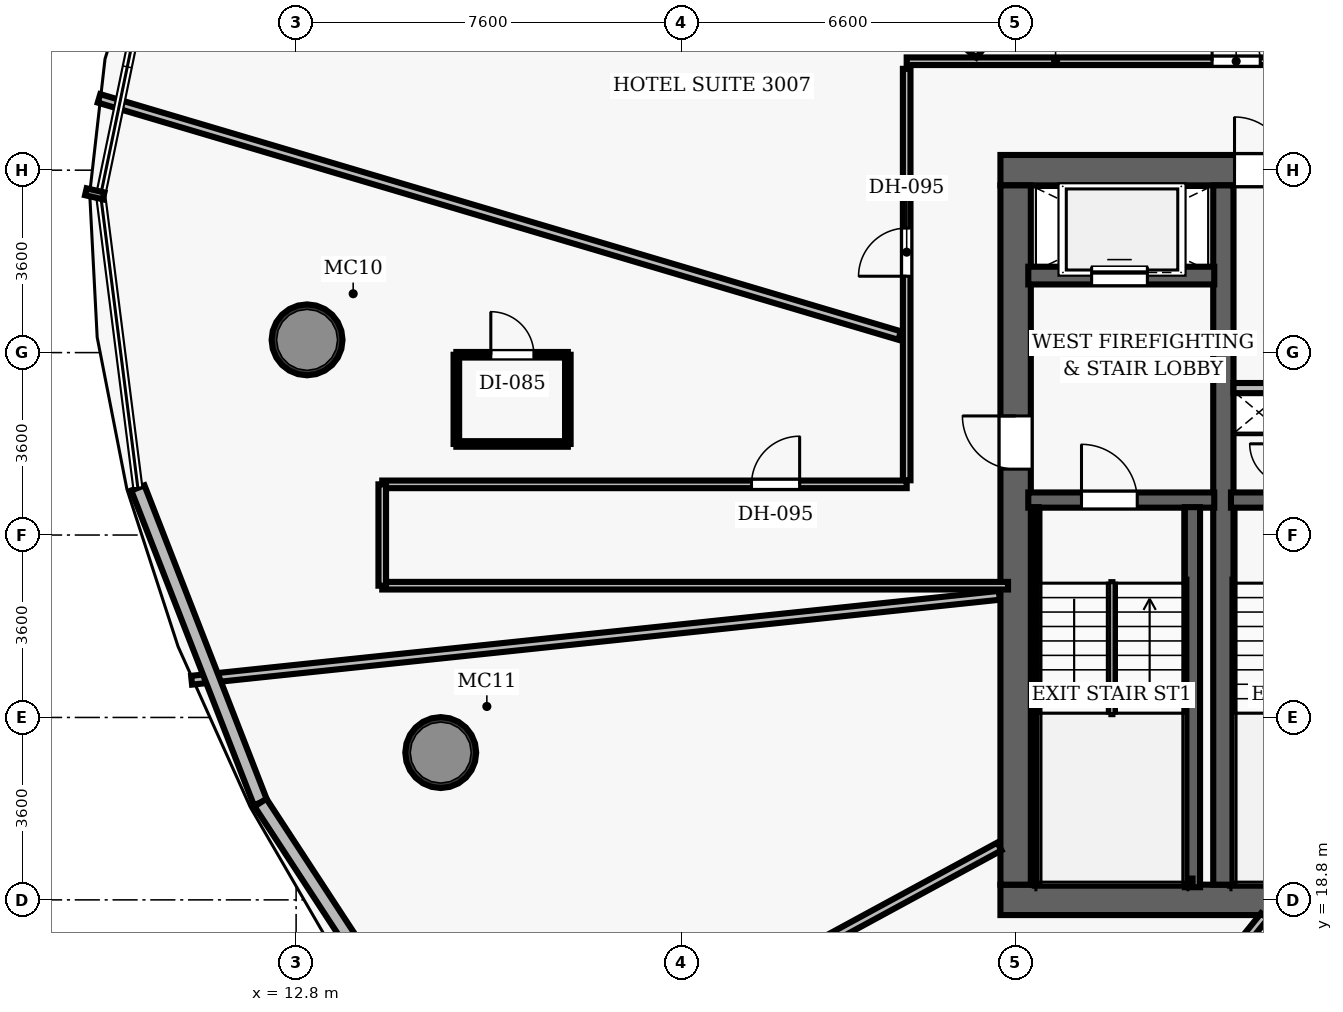
"""IFC4 building model, lengths in metres.
Left out: names, types, materials, properties, quantities, classifications, styles, units other than length and angle.
Written with IfcOpenShell. Run it as: python <this file> out.ifc"""

import sys

from ifc_helpers import new_model, si_unit, direction, frame, frame_2d, origin, origin_2d, place, context, subcontext, project, spatial, rectangle, hollow_circle, extrude, element, fill, save


model = new_model("IFC4")
c1 = context("Model", 3, precision=1e-05, world=origin(), true_north=direction((0.0, 1.0)))
c2 = subcontext(c1, "Body", "Model", "MODEL_VIEW")
j1 = project(units=[si_unit("LENGTHUNIT", "METRE"), si_unit("PLANEANGLEUNIT", "RADIAN")], contexts=[c1])
p1 = place(None, origin())
s1 = spatial("IfcSite", under=j1, at=p1, CompositionType="ELEMENT")
p2 = place(p1, origin())
s2 = spatial("IfcBuilding", under=s1, at=p2, CompositionType="ELEMENT")
p3 = place(p2, frame((0.0, 0.0, 123.8)))
s3 = spatial("IfcBuildingStorey", under=s2, at=p3, CompositionType="ELEMENT", Elevation=123.8)
p4 = place(p3, frame((26.7, 18.8, 0.0), z_axis=(0.0, 0.0, 1.0), x_axis=(1.0, 0.0, 0.0)))
e1 = element("IfcWall", 1, at=p4, inside=s3, PredefinedType="SHEAR", context=c2, shape_type="SweptSolid", body=[
    extrude(rectangle(XDim=22.6, YDim=0.6, at=frame_2d((11.3, 0.0))), origin(), (0.0, 0.0, 1.0), 3.5),
])
p5 = place(p4, frame((14.52, 0.0, 0.0)))
e2 = element("IfcOpeningElement", 2, at=p5, cuts=e1, PredefinedType="OPENING", context=c2, shape_type="SweptSolid", body=[
    extrude(rectangle(XDim=1.05, YDim=2.15, at=frame_2d((0.525, 1.075))), frame((0.0, 0.31, 0.0), z_axis=(0.0, -1.0, 0.0), x_axis=(1.0, 0.0, 0.0)), (0.0, 0.0, 1.0), 0.62),
])
p6 = place(p3, frame((26.7, 33.2, 0.0), z_axis=(0.0, 0.0, 1.0), x_axis=(1.0, 0.0, 0.0)))
e3 = element("IfcWall", 3, at=p6, inside=s3, PredefinedType="SHEAR", context=c2, shape_type="SweptSolid", body=[
    extrude(rectangle(XDim=22.6, YDim=0.6, at=frame_2d((11.3, 0.0))), origin(), (0.0, 0.0, 1.0), 3.5),
])
p7 = place(p6, frame((4.62, 0.0, 0.0)))
e4 = element("IfcOpeningElement", 4, at=p7, cuts=e3, PredefinedType="OPENING", context=c2, shape_type="SweptSolid", body=[
    extrude(rectangle(XDim=1.05, YDim=2.15, at=frame_2d((0.525, 1.075))), frame((0.0, 0.31, 0.0), z_axis=(0.0, -1.0, 0.0), x_axis=(1.0, 0.0, 0.0)), (0.0, 0.0, 1.0), 0.62),
])
p8 = place(p6, frame((14.52, 0.0, 0.0)))
e5 = element("IfcOpeningElement", 5, at=p8, cuts=e3, PredefinedType="OPENING", context=c2, shape_type="SweptSolid", body=[
    extrude(rectangle(XDim=1.05, YDim=2.15, at=frame_2d((0.525, 1.075))), frame((0.0, 0.31, 0.0), z_axis=(0.0, -1.0, 0.0), x_axis=(1.0, 0.0, 0.0)), (0.0, 0.0, 1.0), 0.62),
])
p9 = place(p3, frame((27.0, 19.1, 0.0), z_axis=(0.0, 0.0, 1.0), x_axis=(0.0, 1.0, 0.0)))
e6 = element("IfcWall", 6, at=p9, inside=s3, PredefinedType="SHEAR", context=c2, shape_type="SweptSolid", body=[
    extrude(rectangle(XDim=13.8, YDim=0.6, at=frame_2d((6.9, 0.0))), origin(), (0.0, 0.0, 1.0), 3.5),
])
p10 = place(p9, frame((8.2, 0.0, 0.0)))
e7 = element("IfcOpeningElement", 7, at=p10, cuts=e6, PredefinedType="OPENING", context=c2, shape_type="SweptSolid", body=[
    extrude(rectangle(XDim=1.05, YDim=2.15, at=frame_2d((0.525, 1.075))), frame((0.0, 0.31, 0.0), z_axis=(0.0, -1.0, 0.0), x_axis=(1.0, 0.0, 0.0)), (0.0, 0.0, 1.0), 0.62),
])
p11 = place(p3, frame((31.1, 19.1, 0.0), z_axis=(0.0, 0.0, 1.0), x_axis=(0.0, 1.0, 0.0)))
e8 = element("IfcWall", 8, at=p11, inside=s3, PredefinedType="SHEAR", context=c2, shape_type="SweptSolid", body=[
    extrude(rectangle(XDim=13.8, YDim=0.4, at=frame_2d((6.9, 0.0))), origin(), (0.0, 0.0, 1.0), 3.5),
])
for number, where, z_axis, x_axis in (
    (9, (13.016, 29.852, 0.0), (0.0, 0.0, 1.0), (1.0, 0.0, 0.0)),
    (10, (15.654, 21.707, 0.0), (0.0, 0.0, 1.0), (1.0, 0.0, 0.0)),
):
    element("IfcColumn", number, at=place(p3, frame(where, z_axis=z_axis, x_axis=x_axis)), inside=s3, PredefinedType="COLUMN", context=c2, shape_type="SweptSolid", body=[
        extrude(hollow_circle(Radius=0.7, WallThickness=0.055, at=origin_2d()), origin(), (0.0, 0.0, 1.0), 3.5),
    ])
p12 = place(p3, frame((27.25, 26.69, 0.0), z_axis=(0.0, 0.0, 1.0), x_axis=(1.0, 0.0, 0.0)))
e11 = element("IfcWall", 11, at=p12, inside=s3, PredefinedType="SHEAR", context=c2, shape_type="SweptSolid", body=[
    extrude(rectangle(XDim=3.67, YDim=0.3, at=frame_2d((1.835, 0.0))), origin(), (0.0, 0.0, 1.0), 3.5),
])
p13 = place(p12, frame((1.05, 0.0, 0.0)))
e12 = element("IfcOpeningElement", 12, at=p13, cuts=e11, PredefinedType="OPENING", context=c2, shape_type="SweptSolid", body=[
    extrude(rectangle(XDim=1.1, YDim=2.15, at=frame_2d((0.55, 1.075))), frame((0.0, 0.16, 0.0), z_axis=(0.0, -1.0, 0.0), x_axis=(1.0, 0.0, 0.0)), (0.0, 0.0, 1.0), 0.32),
])
p14 = place(p3, frame((30.49, 19.05, 0.0), z_axis=(0.0, 0.0, 1.0), x_axis=(0.0, 1.0, 0.0)))
e13 = element("IfcWall", 13, at=p14, inside=s3, PredefinedType="SHEAR", context=c2, shape_type="SweptSolid", body=[
    extrude(rectangle(XDim=7.5, YDim=0.3, at=frame_2d((3.75, 0.0))), origin(), (0.0, 0.0, 1.0), 3.5),
])
p15 = place(p3, frame((27.395, 19.1, 0.0), z_axis=(0.0, 0.0, 1.0), x_axis=(0.0, 1.0, 0.0)))
e14 = element("IfcWall", 14, at=p15, inside=s3, PredefinedType="SHEAR", context=c2, shape_type="SweptSolid", body=[
    extrude(rectangle(XDim=7.45, YDim=0.12, at=frame_2d((3.725, 0.0))), origin(), (0.0, 0.0, 1.0), 3.5),
])
p16 = place(p3, frame((27.395, 19.16, 0.0), z_axis=(0.0, 0.0, 1.0), x_axis=(1.0, 0.0, 0.0)))
e15 = element("IfcWall", 15, at=p16, inside=s3, PredefinedType="SHEAR", context=c2, shape_type="SweptSolid", body=[
    extrude(rectangle(XDim=3.095, YDim=0.12, at=frame_2d((1.547, 0.0))), origin(), (0.0, 0.0, 1.0), 3.5),
])
p17 = place(p3, frame((27.25, 31.12, 0.0), z_axis=(0.0, 0.0, 1.0), x_axis=(1.0, 0.0, 0.0)))
e16 = element("IfcWall", 16, at=p17, inside=s3, PredefinedType="SHEAR", context=c2, shape_type="SweptSolid", body=[
    extrude(rectangle(XDim=3.67, YDim=0.35, at=frame_2d((1.835, 0.0))), origin(), (0.0, 0.0, 1.0), 2.675),
])
p18 = place(p17, frame((1.25, 0.0, 0.0)))
e17 = element("IfcOpeningElement", 17, at=p18, cuts=e16, PredefinedType="OPENING", context=c2, shape_type="SweptSolid", body=[
    extrude(rectangle(XDim=1.1, YDim=2.15, at=frame_2d((0.55, 1.075))), frame((0.0, 0.185, 0.0), z_axis=(0.0, -1.0, 0.0), x_axis=(1.0, 0.0, 0.0)), (0.0, 0.0, 1.0), 0.37),
])
p19 = place(p3, frame((31.25, 26.69, 0.0), z_axis=(0.0, 0.0, 1.0), x_axis=(1.0, 0.0, 0.0)))
e18 = element("IfcWall", 18, at=p19, inside=s3, PredefinedType="SHEAR", context=c2, shape_type="SweptSolid", body=[
    extrude(rectangle(XDim=3.56, YDim=0.3, at=frame_2d((1.78, 0.0))), origin(), (0.0, 0.0, 1.0), 3.5),
])
p20 = place(p19, frame((1.55, 0.0, 0.0)))
e19 = element("IfcOpeningElement", 19, at=p20, cuts=e18, PredefinedType="OPENING", context=c2, shape_type="SweptSolid", body=[
    extrude(rectangle(XDim=1.1, YDim=2.15, at=frame_2d((0.55, 1.075))), frame((0.0, 0.16, 0.0), z_axis=(0.0, -1.0, 0.0), x_axis=(1.0, 0.0, 0.0)), (0.0, 0.0, 1.0), 0.32),
])
p21 = place(p3, frame((31.3, 19.16, 0.0), z_axis=(0.0, 0.0, 1.0), x_axis=(1.0, 0.0, 0.0)))
e20 = element("IfcWall", 20, at=p21, inside=s3, PredefinedType="SHEAR", context=c2, shape_type="SweptSolid", body=[
    extrude(rectangle(XDim=3.04, YDim=0.12, at=frame_2d((1.52, 0.0))), origin(), (0.0, 0.0, 1.0), 3.5),
])
p22 = place(p3, frame((31.3, 28.9, 0.0), z_axis=(0.0, 0.0, 1.0), x_axis=(1.0, 0.0, 0.0)))
e21 = element("IfcWall", 21, at=p22, inside=s3, PredefinedType="PARTITIONING", context=c2, shape_type="SweptSolid", body=[
    extrude(rectangle(XDim=1.12, YDim=0.2, at=frame_2d((0.56, 0.0))), origin(), (0.0, 0.0, 1.0), 2.675),
])
p23 = place(p3, frame((24.85, 35.35, 0.0), z_axis=(0.0, 0.0, 1.0), x_axis=(1.0, 0.0, 0.0)))
e22 = element("IfcWall", 22, at=p23, inside=s3, PredefinedType="PARTITIONING", context=c2, shape_type="SweptSolid", body=[
    extrude(rectangle(XDim=26.0, YDim=0.15, at=frame_2d((13.0, 0.0))), origin(), (0.0, 0.0, 1.0), 2.675),
])
p24 = place(p23, frame((21.964, 0.0, 0.0)))
e23 = element("IfcOpeningElement", 23, at=p24, cuts=e22, PredefinedType="OPENING", context=c2, shape_type="SweptSolid", body=[
    extrude(rectangle(XDim=0.95, YDim=2.15, at=frame_2d((0.475, 1.075))), frame((0.0, 0.085, 0.0), z_axis=(0.0, -1.0, 0.0), x_axis=(1.0, 0.0, 0.0)), (0.0, 0.0, 1.0), 0.17),
])
p25 = place(p23, frame((16.552, 0.0, 0.0)))
e24 = element("IfcOpeningElement", 24, at=p25, cuts=e22, PredefinedType="OPENING", context=c2, shape_type="SweptSolid", body=[
    extrude(rectangle(XDim=0.95, YDim=2.15, at=frame_2d((0.475, 1.075))), frame((0.0, 0.085, 0.0), z_axis=(0.0, -1.0, 0.0), x_axis=(1.0, 0.0, 0.0)), (0.0, 0.0, 1.0), 0.17),
])
p26 = place(p23, frame((12.921, 0.0, 0.0)))
e25 = element("IfcOpeningElement", 25, at=p26, cuts=e22, PredefinedType="OPENING", context=c2, shape_type="SweptSolid", body=[
    extrude(rectangle(XDim=0.95, YDim=2.15, at=frame_2d((0.475, 1.075))), frame((0.0, 0.085, 0.0), z_axis=(0.0, -1.0, 0.0), x_axis=(1.0, 0.0, 0.0)), (0.0, 0.0, 1.0), 0.17),
])
p27 = place(p23, frame((8.894, 0.0, 0.0)))
e26 = element("IfcOpeningElement", 26, at=p27, cuts=e22, PredefinedType="OPENING", context=c2, shape_type="SweptSolid", body=[
    extrude(rectangle(XDim=0.95, YDim=2.15, at=frame_2d((0.475, 1.075))), frame((0.0, 0.085, 0.0), z_axis=(0.0, -1.0, 0.0), x_axis=(1.0, 0.0, 0.0)), (0.0, 0.0, 1.0), 0.17),
])
p28 = place(p23, frame((6.027, 0.0, 0.0)))
e27 = element("IfcOpeningElement", 27, at=p28, cuts=e22, PredefinedType="OPENING", context=c2, shape_type="SweptSolid", body=[
    extrude(rectangle(XDim=0.95, YDim=2.15, at=frame_2d((0.475, 1.075))), frame((0.0, 0.085, 0.0), z_axis=(0.0, -1.0, 0.0), x_axis=(1.0, 0.0, 0.0)), (0.0, 0.0, 1.0), 0.17),
])
p29 = place(p3, frame((24.85, 27.08, 0.0), z_axis=(0.0, 0.0, 1.0), x_axis=(0.0, 1.0, 0.0)))
e28 = element("IfcWall", 28, at=p29, inside=s3, PredefinedType="PARTITIONING", context=c2, shape_type="SweptSolid", body=[
    extrude(rectangle(XDim=8.12, YDim=0.15, at=frame_2d((4.06, 0.0))), origin(), (0.0, 0.0, 1.0), 2.675),
])
p30 = place(p29, frame((4.027, 0.0, 0.0)))
e29 = element("IfcOpeningElement", 29, at=p30, cuts=e28, PredefinedType="OPENING", context=c2, shape_type="SweptSolid", body=[
    extrude(rectangle(XDim=0.95, YDim=2.15, at=frame_2d((0.475, 1.075))), frame((0.0, 0.085, 0.0), z_axis=(0.0, -1.0, 0.0), x_axis=(1.0, 0.0, 0.0)), (0.0, 0.0, 1.0), 0.17),
])
p31 = place(p3, frame((14.5, 27.0, 0.0), z_axis=(0.0, 0.0, 1.0), x_axis=(1.0, 0.0, 0.0)))
e30 = element("IfcWall", 30, at=p31, inside=s3, PredefinedType="PARTITIONING", context=c2, shape_type="SweptSolid", body=[
    extrude(rectangle(XDim=10.35, YDim=0.15, at=frame_2d((5.175, 0.0))), origin(), (0.0, 0.0, 1.0), 2.675),
])
p32 = place(p31, frame((7.288, 0.0, 0.0)))
e31 = element("IfcOpeningElement", 31, at=p32, cuts=e30, PredefinedType="OPENING", context=c2, shape_type="SweptSolid", body=[
    extrude(rectangle(XDim=0.95, YDim=2.15, at=frame_2d((0.475, 1.075))), frame((0.0, 0.085, 0.0), z_axis=(0.0, -1.0, 0.0), x_axis=(1.0, 0.0, 0.0)), (0.0, 0.0, 1.0), 0.17),
])
p33 = place(p3, frame((14.5, 25.0, 0.0), z_axis=(0.0, 0.0, 1.0), x_axis=(1.0, 0.0, 0.0)))
e32 = element("IfcWall", 32, at=p33, inside=s3, PredefinedType="PARTITIONING", context=c2, shape_type="SweptSolid", body=[
    extrude(rectangle(XDim=12.35, YDim=0.15, at=frame_2d((6.175, 0.0))), origin(), (0.0, 0.0, 1.0), 2.675),
])
p34 = place(p3, frame((14.5, 25.0, 0.0), z_axis=(0.0, 0.0, 1.0), x_axis=(0.0, 1.0, 0.0)))
e33 = element("IfcWall", 33, at=p34, inside=s3, PredefinedType="PARTITIONING", context=c2, shape_type="SweptSolid", body=[
    extrude(rectangle(XDim=2.0, YDim=0.15, at=frame_2d((1.0, 0.0))), origin(), (0.0, 0.0, 1.0), 2.675),
])
p35 = place(p3, frame((32.847, 35.49, 0.0), z_axis=(0.0, 0.0, 1.0), x_axis=(-0.477169302066, 0.878811388846, 0.0)))
e34 = element("IfcWall", 34, at=p35, inside=s3, PredefinedType="PARTITIONING", context=c2, shape_type="SweptSolid", body=[
    extrude(rectangle(XDim=15.306, YDim=0.175, at=frame_2d((7.653, 0.0))), origin(), (0.0, 0.0, 1.0), 2.675),
])
p36 = place(p3, frame((26.281, 35.49, 0.0), z_axis=(0.0, 0.0, 1.0), x_axis=(-0.777136881542, 0.629331603646, 0.0)))
e35 = element("IfcWall", 35, at=p36, inside=s3, PredefinedType="PARTITIONING", context=c2, shape_type="SweptSolid", body=[
    extrude(rectangle(XDim=14.164, YDim=0.175, at=frame_2d((7.082, 0.0))), origin(), (0.0, 0.0, 1.0), 2.675),
])
p37 = place(p3, frame((24.71, 29.937, 0.0), z_axis=(0.0, 0.0, 1.0), x_axis=(-0.958822771046, 0.284005094539, 0.0)))
e36 = element("IfcWall", 36, at=p37, inside=s3, PredefinedType="PARTITIONING", context=c2, shape_type="SweptSolid", body=[
    extrude(rectangle(XDim=16.478, YDim=0.175, at=frame_2d((8.239, 0.0))), origin(), (0.0, 0.0, 1.0), 2.675),
])
p38 = place(p3, frame((26.678, 24.81, 0.0), z_axis=(0.0, 0.0, 1.0), x_axis=(-0.994521382237, -0.104533345274, 0.0)))
e37 = element("IfcWall", 37, at=p38, inside=s3, PredefinedType="PARTITIONING", context=c2, shape_type="SweptSolid", body=[
    extrude(rectangle(XDim=16.029, YDim=0.175, at=frame_2d((8.014, 0.0))), origin(), (0.0, 0.0, 1.0), 2.675),
])
p39 = place(p3, frame((26.68, 19.854, 0.0), z_axis=(0.0, 0.0, 1.0), x_axis=(-0.878819691028, -0.47715401147, 0.0)))
e38 = element("IfcWall", 38, at=p39, inside=s3, PredefinedType="PARTITIONING", context=c2, shape_type="SweptSolid", body=[
    extrude(rectangle(XDim=11.963, YDim=0.175, at=frame_2d((5.981, 0.0))), origin(), (0.0, 0.0, 1.0), 2.675),
])
p40 = place(p3, frame((31.91, 18.48, 0.0), z_axis=(0.0, 0.0, 1.0), x_axis=(-0.629315289337, -0.777150092715, 0.0)))
e39 = element("IfcWall", 39, at=p40, inside=s3, PredefinedType="PARTITIONING", context=c2, shape_type="SweptSolid", body=[
    extrude(rectangle(XDim=13.738, YDim=0.175, at=frame_2d((6.869, 0.0))), origin(), (0.0, 0.0, 1.0), 2.675),
])
p41 = place(p3, frame((35.772, 18.48, 0.0), z_axis=(0.0, 0.0, 1.0), x_axis=(-0.284008430424, -0.958821782944, 0.0)))
e40 = element("IfcWall", 40, at=p41, inside=s3, PredefinedType="PARTITIONING", context=c2, shape_type="SweptSolid", body=[
    extrude(rectangle(XDim=15.085, YDim=0.175, at=frame_2d((7.543, 0.0))), origin(), (0.0, 0.0, 1.0), 2.675),
])
p42 = place(p3, frame((15.963, 27.797, 0.0), z_axis=(0.0, 0.0, 1.0), x_axis=(1.0, 0.0, 0.0)))
e41 = element("IfcWall", 41, at=p42, inside=s3, PredefinedType="PARTITIONING", context=c2, shape_type="SweptSolid", body=[
    extrude(rectangle(XDim=2.2, YDim=0.11, at=frame_2d((1.1, 0.0))), origin(), (0.0, 0.0, 1.0), 2.675),
])
p43 = place(p3, frame((15.963, 29.557, 0.0), z_axis=(0.0, 0.0, 1.0), x_axis=(1.0, 0.0, 0.0)))
e42 = element("IfcWall", 42, at=p43, inside=s3, PredefinedType="PARTITIONING", context=c2, shape_type="SweptSolid", body=[
    extrude(rectangle(XDim=2.2, YDim=0.11, at=frame_2d((1.1, 0.0))), origin(), (0.0, 0.0, 1.0), 2.675),
])
p44 = place(p43, frame((0.68, 0.0, 0.0)))
e43 = element("IfcOpeningElement", 43, at=p44, cuts=e42, PredefinedType="OPENING", context=c2, shape_type="SweptSolid", body=[
    extrude(rectangle(XDim=0.85, YDim=2.1, at=frame_2d((0.425, 1.05))), frame((0.0, 0.065, 0.0), z_axis=(0.0, -1.0, 0.0), x_axis=(1.0, 0.0, 0.0)), (0.0, 0.0, 1.0), 0.13),
])
for number, where, z_axis, x_axis in (
    (44, (15.963, 27.797, 0.0), (0.0, 0.0, 1.0), (0.0, 1.0, 0.0)),
    (45, (18.163, 27.797, 0.0), (0.0, 0.0, 1.0), (0.0, 1.0, 0.0)),
):
    element("IfcWall", number, at=place(p3, frame(where, z_axis=z_axis, x_axis=x_axis)), inside=s3, PredefinedType="PARTITIONING", context=c2, shape_type="SweptSolid", body=[
        extrude(rectangle(XDim=1.76, YDim=0.11, at=frame_2d((0.88, 0.0))), origin(), (0.0, 0.0, 1.0), 2.675),
    ])
p45 = place(p3, frame((12.096, 20.72, 0.0), z_axis=(0.0, 0.0, 1.0), x_axis=(-0.363045434625, 0.931771437853, 0.0)))
e46 = element("IfcWall", 46, at=p45, inside=s3, PredefinedType="SOLIDWALL", context=c2, shape_type="SweptSolid", body=[
    extrude(rectangle(XDim=6.665, YDim=0.28, at=frame_2d((3.333, 0.0))), origin(), (0.0, 0.0, 1.0), 3.26),
])
p46 = place(p3, frame((16.086, 14.616, 0.0), z_axis=(0.0, 0.0, 1.0), x_axis=(-0.547175391008, 0.837017975598, 0.0)))
e47 = element("IfcWall", 47, at=p46, inside=s3, PredefinedType="SOLIDWALL", context=c2, shape_type="SweptSolid", body=[
    extrude(rectangle(XDim=7.292, YDim=0.28, at=frame_2d((3.646, 0.0))), origin(), (0.0, 0.0, 1.0), 3.26),
])
p47 = place(p13, origin())
e48 = element("IfcDoor", 48, at=p47, inside=s3, OperationType="SINGLE_SWING_LEFT", PredefinedType="DOOR", context=c2, shape_type="SweptSolid", body=[
    extrude(rectangle(XDim=1.1, YDim=2.15, at=frame_2d((0.55, 1.075))), frame((0.0, 0.025, 0.0), z_axis=(0.0, -1.0, 0.0), x_axis=(1.0, 0.0, 0.0)), (0.0, 0.0, 1.0), 0.05),
])
fill(e12, e48)
p48 = place(p10, origin())
e49 = element("IfcDoor", 49, at=p48, inside=s3, OperationType="SINGLE_SWING_RIGHT", PredefinedType="DOOR", context=c2, shape_type="SweptSolid", body=[
    extrude(rectangle(XDim=1.05, YDim=2.15, at=frame_2d((0.525, 1.075))), frame((0.0, 0.025, 0.0), z_axis=(0.0, -1.0, 0.0), x_axis=(1.0, 0.0, 0.0)), (0.0, 0.0, 1.0), 0.05),
])
fill(e7, e49)
p49 = place(p7, origin())
e50 = element("IfcDoor", 50, at=p49, inside=s3, OperationType="SINGLE_SWING_LEFT", PredefinedType="DOOR", context=c2, shape_type="SweptSolid", body=[
    extrude(rectangle(XDim=1.05, YDim=2.15, at=frame_2d((0.525, 1.075))), frame((0.0, 0.025, 0.0), z_axis=(0.0, -1.0, 0.0), x_axis=(1.0, 0.0, 0.0)), (0.0, 0.0, 1.0), 0.05),
])
fill(e4, e50)
p50 = place(p28, origin())
e51 = element("IfcDoor", 51, at=p50, inside=s3, OperationType="SINGLE_SWING_LEFT", PredefinedType="DOOR", context=c2, shape_type="SweptSolid", body=[
    extrude(rectangle(XDim=0.95, YDim=2.15, at=frame_2d((0.475, 1.075))), frame((0.0, 0.025, 0.0), z_axis=(0.0, -1.0, 0.0), x_axis=(1.0, 0.0, 0.0)), (0.0, 0.0, 1.0), 0.05),
])
fill(e27, e51)
p51 = place(p30, origin())
e52 = element("IfcDoor", 52, at=p51, inside=s3, OperationType="SINGLE_SWING_LEFT", PredefinedType="DOOR", context=c2, shape_type="SweptSolid", body=[
    extrude(rectangle(XDim=0.95, YDim=2.15, at=frame_2d((0.475, 1.075))), frame((0.0, 0.025, 0.0), z_axis=(0.0, -1.0, 0.0), x_axis=(1.0, 0.0, 0.0)), (0.0, 0.0, 1.0), 0.05),
])
fill(e29, e52)
p52 = place(p32, origin())
e53 = element("IfcDoor", 53, at=p52, inside=s3, OperationType="SINGLE_SWING_RIGHT", PredefinedType="DOOR", context=c2, shape_type="SweptSolid", body=[
    extrude(rectangle(XDim=0.95, YDim=2.15, at=frame_2d((0.475, 1.075))), frame((0.0, 0.025, 0.0), z_axis=(0.0, -1.0, 0.0), x_axis=(1.0, 0.0, 0.0)), (0.0, 0.0, 1.0), 0.05),
])
fill(e31, e53)
p53 = place(p44, origin())
e54 = element("IfcDoor", 54, at=p53, inside=s3, OperationType="SINGLE_SWING_LEFT", PredefinedType="DOOR", context=c2, shape_type="SweptSolid", body=[
    extrude(rectangle(XDim=0.85, YDim=2.1, at=frame_2d((0.425, 1.05))), frame((0.0, 0.025, 0.0), z_axis=(0.0, -1.0, 0.0), x_axis=(1.0, 0.0, 0.0)), (0.0, 0.0, 1.0), 0.05),
])
fill(e43, e54)
p54 = place(p18, origin())
e55 = element("IfcDoor", 55, at=p54, inside=s3, OperationType="SLIDING_TO_LEFT", PredefinedType="DOOR", context=c2, shape_type="SweptSolid", body=[
    extrude(rectangle(XDim=1.1, YDim=2.15, at=frame_2d((0.55, 1.075))), frame((0.0, 0.025, 0.0), z_axis=(0.0, -1.0, 0.0), x_axis=(1.0, 0.0, 0.0)), (0.0, 0.0, 1.0), 0.05),
])
fill(e17, e55)
save(model, sys.argv[1])
